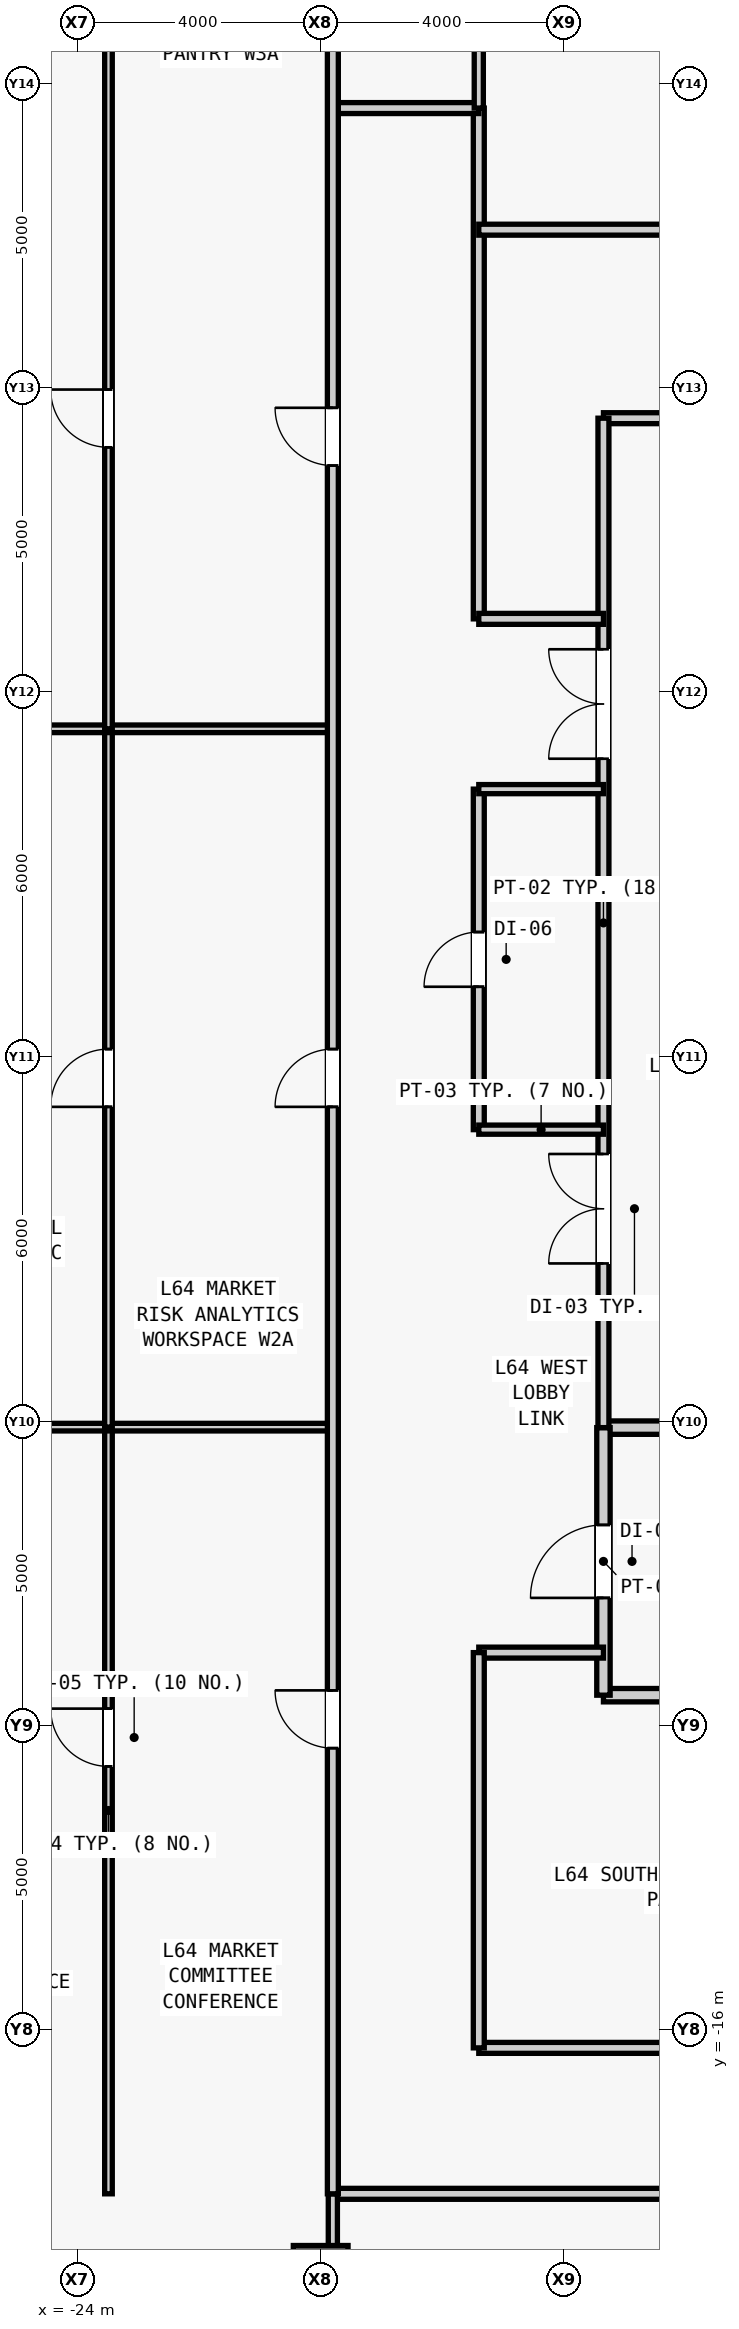
"""IFC4 building model, lengths in metres.
Left out: names, types, materials, properties, quantities, classifications, styles, units other than length and angle.
Written with IfcOpenShell. Run it as: python <this file> out.ifc"""

import sys

from ifc_helpers import new_model, si_unit, direction, frame, frame_2d, origin, origin_2d, place, context, subcontext, project, spatial, rectangle, hollow_rectangle, extrude, source, transform, mapped, element, fill, save


model = new_model("IFC4")
c1 = context("Model", 3, precision=1e-05, world=origin(), true_north=direction((0.0, 1.0)))
c2 = subcontext(c1, "Body", "Model", "MODEL_VIEW")
j1 = project(units=[si_unit("LENGTHUNIT", "METRE"), si_unit("PLANEANGLEUNIT", "RADIAN")], contexts=[c1])
p1 = place(None, origin())
s1 = spatial("IfcSite", under=j1, at=p1, CompositionType="ELEMENT")
p2 = place(p1, origin())
s2 = spatial("IfcBuilding", under=s1, at=p2, CompositionType="ELEMENT")
p3 = place(p2, frame((0.0, 0.0, 273.5)))
s3 = spatial("IfcBuildingStorey", under=s2, at=p3, CompositionType="ELEMENT", Elevation=273.5)
m1 = source(origin(), c2, "Body", "SweptSolid", [
    extrude(hollow_rectangle(XDim=0.9, YDim=0.9, WallThickness=0.05, at=origin_2d()), origin(), (0.0, 0.0, 1.0), 4.0),
])
p4 = place(p3, frame((-20.0, -20.0, 0.0), z_axis=(0.0, 0.0, 1.0), x_axis=(1.0, 0.0, 0.0)))
e1 = element("IfcColumn", 1, at=p4, inside=s3, PredefinedType="COLUMN", context=c2, shape_type="MappedRepresentation", body=[
    mapped(m1, transform((0.0, 0.0, 0.0), scale=1.0)),
])
m2 = source(origin(), c2, "Body", "SweptSolid", [
    extrude(rectangle(XDim=4.05, YDim=0.22, at=frame_2d((2.025, 0.0))), origin(), (0.0, 0.0, 1.0), 3.78),
])
p5 = place(p3, frame((-15.35, -10.5, 0.0), z_axis=(0.0, 0.0, 1.0), x_axis=(1.0, 0.0, 0.0)))
e2 = element("IfcWall", 2, at=p5, inside=s3, PredefinedType="PARTITIONING", context=c2, shape_type="MappedRepresentation", body=[
    mapped(m2, transform((0.0, 0.0, 0.0), scale=1.0)),
])
m3 = source(origin(), c2, "Body", "SweptSolid", [
    extrude(rectangle(XDim=4.05, YDim=0.22, at=frame_2d((2.025, 0.0))), origin(), (0.0, 0.0, 1.0), 3.085),
])
p6 = place(p3, frame((-15.35, -6.1, 0.0), z_axis=(0.0, 0.0, 1.0), x_axis=(1.0, 0.0, 0.0)))
e3 = element("IfcWall", 3, at=p6, inside=s3, PredefinedType="PARTITIONING", context=c2, shape_type="MappedRepresentation", body=[
    mapped(m3, transform((0.0, 0.0, 0.0), scale=1.0)),
])
m4 = source(origin(), c2, "Body", "SweptSolid", [
    extrude(rectangle(XDim=4.4, YDim=0.22, at=frame_2d((2.2, 0.0))), origin(), (0.0, 0.0, 1.0), 3.78),
])
p7 = place(p3, frame((-15.35, -10.5, 0.0), z_axis=(0.0, 0.0, 1.0), x_axis=(0.0, 1.0, 0.0)))
e4 = element("IfcWall", 4, at=p7, inside=s3, PredefinedType="PARTITIONING", context=c2, shape_type="MappedRepresentation", body=[
    mapped(m4, transform((0.0, 0.0, 0.0), scale=1.0)),
])
m5 = source(origin(), c2, "Body", "SweptSolid", [
    extrude(rectangle(XDim=1.2, YDim=2.2, at=frame_2d((0.6, 1.1))), frame((0.0, 0.12, 0.0), z_axis=(0.0, -1.0, 0.0), x_axis=(1.0, 0.0, 0.0)), (0.0, 0.0, 1.0), 0.24),
])
p8 = place(p7, frame((1.6, 0.0, 0.0)))
e5 = element("IfcOpeningElement", 5, at=p8, cuts=e4, PredefinedType="OPENING", context=c2, shape_type="MappedRepresentation", body=[
    mapped(m5, transform((0.0, 0.0, 0.0), scale=1.0)),
])
m6 = source(origin(), c2, "Body", "SweptSolid", [
    extrude(rectangle(XDim=4.05, YDim=0.18, at=frame_2d((2.025, 0.0))), origin(), (0.0, 0.0, 1.0), 3.78),
])
p9 = place(p3, frame((-15.35, 10.5, 0.0), z_axis=(0.0, 0.0, 1.0), x_axis=(1.0, 0.0, 0.0)))
e6 = element("IfcWall", 6, at=p9, inside=s3, PredefinedType="PARTITIONING", context=c2, shape_type="MappedRepresentation", body=[
    mapped(m6, transform((0.0, 0.0, 0.0), scale=1.0)),
])
m7 = source(origin(), c2, "Body", "SweptSolid", [
    extrude(rectangle(XDim=16.6, YDim=0.18, at=frame_2d((8.3, 0.0))), origin(), (0.0, 0.0, 1.0), 3.78),
])
p10 = place(p3, frame((-15.35, -6.1, 0.0), z_axis=(0.0, 0.0, 1.0), x_axis=(0.0, 1.0, 0.0)))
e7 = element("IfcWall", 7, at=p10, inside=s3, PredefinedType="PARTITIONING", context=c2, shape_type="MappedRepresentation", body=[
    mapped(m7, transform((0.0, 0.0, 0.0), scale=1.0)),
])
m8 = source(origin(), c2, "Body", "SweptSolid", [
    extrude(rectangle(XDim=1.8, YDim=2.25, at=frame_2d((0.9, 1.125))), frame((0.0, 0.1, 0.0), z_axis=(0.0, -1.0, 0.0), x_axis=(1.0, 0.0, 0.0)), (0.0, 0.0, 1.0), 0.2),
])
p11 = place(p10, frame((2.7, 0.0, 0.0)))
e8 = element("IfcOpeningElement", 8, at=p11, cuts=e7, PredefinedType="OPENING", context=c2, shape_type="MappedRepresentation", body=[
    mapped(m8, transform((0.0, 0.0, 0.0), scale=1.0)),
])
p12 = place(p10, frame((11.0, 0.0, 0.0)))
e9 = element("IfcOpeningElement", 9, at=p12, cuts=e7, PredefinedType="OPENING", context=c2, shape_type="MappedRepresentation", body=[
    mapped(m8, transform((0.0, 0.0, 0.0), scale=1.0)),
])
m9 = source(origin(), c2, "Body", "SweptSolid", [
    extrude(rectangle(XDim=5.6, YDim=0.18, at=frame_2d((2.8, 0.0))), origin(), (0.0, 0.0, 1.0), 3.78),
])
p13 = place(p3, frame((-17.4, -1.2, 0.0), z_axis=(0.0, 0.0, 1.0), x_axis=(0.0, 1.0, 0.0)))
e10 = element("IfcWall", 10, at=p13, inside=s3, PredefinedType="PARTITIONING", context=c2, shape_type="MappedRepresentation", body=[
    mapped(m9, transform((0.0, 0.0, 0.0), scale=1.0)),
])
m10 = source(origin(), c2, "Body", "SweptSolid", [
    extrude(rectangle(XDim=0.9, YDim=2.15, at=frame_2d((0.45, 1.075))), frame((0.0, 0.1, 0.0), z_axis=(0.0, -1.0, 0.0), x_axis=(1.0, 0.0, 0.0)), (0.0, 0.0, 1.0), 0.2),
])
p14 = place(p13, frame((2.35, 0.0, 0.0)))
e11 = element("IfcOpeningElement", 11, at=p14, cuts=e10, PredefinedType="OPENING", context=c2, shape_type="MappedRepresentation", body=[
    mapped(m10, transform((0.0, 0.0, 0.0), scale=1.0)),
])
m11 = source(origin(), c2, "Body", "SweptSolid", [
    extrude(rectangle(XDim=2.05, YDim=0.15, at=frame_2d((1.025, 0.0))), origin(), (0.0, 0.0, 1.0), 3.78),
])
for number, where, z_axis, x_axis in (
    (12, (-17.4, -1.2, 0.0), (0.0, 0.0, 1.0), (1.0, 0.0, 0.0)),
    (13, (-17.4, 4.4, 0.0), (0.0, 0.0, 1.0), (1.0, 0.0, 0.0)),
):
    element("IfcWall", number, at=place(p3, frame(where, z_axis=z_axis, x_axis=x_axis)), inside=s3, PredefinedType="PARTITIONING", context=c2, shape_type="MappedRepresentation", body=[
        mapped(m11, transform((0.0, 0.0, 0.0), scale=1.0)),
    ])
m12 = source(origin(), c2, "Body", "SweptSolid", [
    extrude(rectangle(XDim=2.05, YDim=0.18, at=frame_2d((1.025, 0.0))), origin(), (0.0, 0.0, 1.0), 3.78),
])
p15 = place(p3, frame((-17.4, -9.8, 0.0), z_axis=(0.0, 0.0, 1.0), x_axis=(1.0, 0.0, 0.0)))
e14 = element("IfcWall", 14, at=p15, inside=s3, PredefinedType="PARTITIONING", context=c2, shape_type="MappedRepresentation", body=[
    mapped(m12, transform((0.0, 0.0, 0.0), scale=1.0)),
])
m13 = source(origin(), c2, "Body", "SweptSolid", [
    extrude(rectangle(XDim=8.4, YDim=0.18, at=frame_2d((4.2, 0.0))), origin(), (0.0, 0.0, 1.0), 3.78),
])
p16 = place(p3, frame((-17.4, 7.2, 0.0), z_axis=(0.0, 0.0, 1.0), x_axis=(0.0, 1.0, 0.0)))
e15 = element("IfcWall", 15, at=p16, inside=s3, PredefinedType="PARTITIONING", context=c2, shape_type="MappedRepresentation", body=[
    mapped(m13, transform((0.0, 0.0, 0.0), scale=1.0)),
])
p17 = place(p3, frame((-17.4, 7.2, 0.0), z_axis=(0.0, 0.0, 1.0), x_axis=(1.0, 0.0, 0.0)))
e16 = element("IfcWall", 16, at=p17, inside=s3, PredefinedType="PARTITIONING", context=c2, shape_type="MappedRepresentation", body=[
    mapped(m12, transform((0.0, 0.0, 0.0), scale=1.0)),
])
m14 = source(origin(), c2, "Body", "SweptSolid", [
    extrude(rectangle(XDim=16.1, YDim=0.18, at=frame_2d((8.05, 0.0))), origin(), (0.0, 0.0, 1.0), 3.78),
])
p18 = place(p3, frame((-17.4, -16.3, 0.0), z_axis=(0.0, 0.0, 1.0), x_axis=(1.0, 0.0, 0.0)))
e17 = element("IfcWall", 17, at=p18, inside=s3, PredefinedType="PARTITIONING", context=c2, shape_type="MappedRepresentation", body=[
    mapped(m14, transform((0.0, 0.0, 0.0), scale=1.0)),
])
p19 = place(p18, frame((8.95, 0.0, 0.0)))
e18 = element("IfcOpeningElement", 18, at=p19, cuts=e17, PredefinedType="OPENING", context=c2, shape_type="MappedRepresentation", body=[
    mapped(m10, transform((0.0, 0.0, 0.0), scale=1.0)),
])
m15 = source(origin(), c2, "Body", "SweptSolid", [
    extrude(rectangle(XDim=6.5, YDim=0.18, at=frame_2d((3.25, 0.0))), origin(), (0.0, 0.0, 1.0), 3.78),
])
p20 = place(p3, frame((-17.4, -16.3, 0.0), z_axis=(0.0, 0.0, 1.0), x_axis=(0.0, 1.0, 0.0)))
e19 = element("IfcWall", 19, at=p20, inside=s3, PredefinedType="PARTITIONING", context=c2, shape_type="MappedRepresentation", body=[
    mapped(m15, transform((0.0, 0.0, 0.0), scale=1.0)),
])
m16 = source(origin(), c2, "Body", "SweptSolid", [
    extrude(rectangle(XDim=2.4, YDim=0.18, at=frame_2d((1.2, 0.0))), origin(), (0.0, 0.0, 1.0), 3.78),
])
p21 = place(p3, frame((-19.8, 15.6, 0.0), z_axis=(0.0, 0.0, 1.0), x_axis=(1.0, 0.0, 0.0)))
e20 = element("IfcWall", 20, at=p21, inside=s3, PredefinedType="PARTITIONING", context=c2, shape_type="MappedRepresentation", body=[
    mapped(m16, transform((0.0, 0.0, 0.0), scale=1.0)),
])
m17 = source(origin(), c2, "Body", "SweptSolid", [
    extrude(rectangle(XDim=37.55, YDim=0.18, at=frame_2d((18.775, 0.0))), origin(), (0.0, 0.0, 1.0), 3.78),
])
p22 = place(p3, frame((-19.8, -18.7, 0.0), z_axis=(0.0, 0.0, 1.0), x_axis=(1.0, 0.0, 0.0)))
e21 = element("IfcWall", 21, at=p22, inside=s3, PredefinedType="PARTITIONING", context=c2, shape_type="MappedRepresentation", body=[
    mapped(m17, transform((0.0, 0.0, 0.0), scale=1.0)),
])
m18 = source(origin(), c2, "Body", "SweptSolid", [
    extrude(rectangle(XDim=1.05, YDim=2.2, at=frame_2d((0.525, 1.1))), frame((0.0, 0.1, 0.0), z_axis=(0.0, -1.0, 0.0), x_axis=(1.0, 0.0, 0.0)), (0.0, 0.0, 1.0), 0.2),
])
p23 = place(p22, frame((7.11, 0.0, 0.0)))
e22 = element("IfcOpeningElement", 22, at=p23, cuts=e21, PredefinedType="OPENING", context=c2, shape_type="MappedRepresentation", body=[
    mapped(m18, transform((0.0, 0.0, 0.0), scale=1.0)),
])
p24 = place(p22, frame((24.86, 0.0, 0.0)))
e23 = element("IfcOpeningElement", 23, at=p24, cuts=e21, PredefinedType="OPENING", context=c2, shape_type="MappedRepresentation", body=[
    mapped(m18, transform((0.0, 0.0, 0.0), scale=1.0)),
])
m19 = source(origin(), c2, "Body", "SweptSolid", [
    extrude(rectangle(XDim=9.3, YDim=0.15, at=frame_2d((4.65, 0.0))), origin(), (0.0, 0.0, 1.0), 3.164),
])
p25 = place(p3, frame((-19.8, -28.0, 0.0), z_axis=(0.0, 0.0, 1.0), x_axis=(0.0, 1.0, 0.0)))
e24 = element("IfcWall", 24, at=p25, inside=s3, PredefinedType="PARTITIONING", context=c2, shape_type="MappedRepresentation", body=[
    mapped(m19, transform((0.0, 0.0, 0.0), scale=1.0)),
])
m20 = source(origin(), c2, "Body", "SweptSolid", [
    extrude(rectangle(XDim=32.75, YDim=0.18, at=frame_2d((16.375, 0.0))), origin(), (0.0, 0.0, 1.0), 3.78),
])
p26 = place(p3, frame((-17.4, 13.6, 0.0), z_axis=(0.0, 0.0, 1.0), x_axis=(1.0, 0.0, 0.0)))
e25 = element("IfcWall", 25, at=p26, inside=s3, PredefinedType="PARTITIONING", context=c2, shape_type="MappedRepresentation", body=[
    mapped(m20, transform((0.0, 0.0, 0.0), scale=1.0)),
])
p27 = place(p26, frame((27.075, 0.0, 0.0)))
e26 = element("IfcOpeningElement", 26, at=p27, cuts=e25, PredefinedType="OPENING", context=c2, shape_type="MappedRepresentation", body=[
    mapped(m18, transform((0.0, 0.0, 0.0), scale=1.0)),
])
m21 = source(origin(), c2, "Body", "SweptSolid", [
    extrude(rectangle(XDim=12.4, YDim=0.15, at=frame_2d((6.2, 0.0))), origin(), (0.0, 0.0, 1.0), 3.78),
])
p28 = place(p3, frame((-17.4, 15.6, 0.0), z_axis=(0.0, 0.0, 1.0), x_axis=(0.0, 1.0, 0.0)))
e27 = element("IfcWall", 27, at=p28, inside=s3, PredefinedType="PARTITIONING", context=c2, shape_type="MappedRepresentation", body=[
    mapped(m21, transform((0.0, 0.0, 0.0), scale=1.0)),
])
m22 = source(origin(), c2, "Body", "SweptSolid", [
    extrude(rectangle(XDim=12.608, YDim=0.125, at=frame_2d((6.304, 0.0))), origin(), (0.0, 0.0, 1.0), 3.78),
])
p29 = place(p3, frame((-23.49, -18.7, 0.0), z_axis=(0.0, 0.0, 1.0), x_axis=(0.0, 1.0, 0.0)))
e28 = element("IfcWall", 28, at=p29, inside=s3, PredefinedType="PARTITIONING", context=c2, shape_type="MappedRepresentation", body=[
    mapped(m22, transform((0.0, 0.0, 0.0), scale=1.0)),
])
m23 = source(origin(), c2, "Body", "SweptSolid", [
    extrude(rectangle(XDim=0.95, YDim=2.15, at=frame_2d((0.475, 1.075))), frame((0.0, 0.073, 0.0), z_axis=(0.0, -1.0, 0.0), x_axis=(1.0, 0.0, 0.0)), (0.0, 0.0, 1.0), 0.145),
])
p30 = place(p29, frame((7.029, 0.0, 0.0)))
e29 = element("IfcOpeningElement", 29, at=p30, cuts=e28, PredefinedType="OPENING", context=c2, shape_type="MappedRepresentation", body=[
    mapped(m23, transform((0.0, 0.0, 0.0), scale=1.0)),
])
m24 = source(origin(), c2, "Body", "SweptSolid", [
    extrude(rectangle(XDim=8.2, YDim=0.125, at=frame_2d((4.1, 0.0))), origin(), (0.0, 0.0, 1.0), 3.085),
])
p31 = place(p3, frame((-28.0, -6.092, 0.0), z_axis=(0.0, 0.0, 1.0), x_axis=(1.0, 0.0, 0.0)))
e30 = element("IfcWall", 30, at=p31, inside=s3, PredefinedType="PARTITIONING", context=c2, shape_type="MappedRepresentation", body=[
    mapped(m24, transform((0.0, 0.0, 0.0), scale=1.0)),
])
m25 = source(origin(), c2, "Body", "SweptSolid", [
    extrude(rectangle(XDim=11.484, YDim=0.125, at=frame_2d((5.742, 0.0))), origin(), (0.0, 0.0, 1.0), 3.78),
])
p32 = place(p3, frame((-23.49, -6.092, 0.0), z_axis=(0.0, 0.0, 1.0), x_axis=(0.0, 1.0, 0.0)))
e31 = element("IfcWall", 31, at=p32, inside=s3, PredefinedType="PARTITIONING", context=c2, shape_type="MappedRepresentation", body=[
    mapped(m25, transform((0.0, 0.0, 0.0), scale=1.0)),
])
p33 = place(p32, frame((5.267, 0.0, 0.0)))
e32 = element("IfcOpeningElement", 32, at=p33, cuts=e31, PredefinedType="OPENING", context=c2, shape_type="MappedRepresentation", body=[
    mapped(m23, transform((0.0, 0.0, 0.0), scale=1.0)),
])
m26 = source(origin(), c2, "Body", "SweptSolid", [
    extrude(rectangle(XDim=8.2, YDim=0.125, at=frame_2d((4.1, 0.0))), origin(), (0.0, 0.0, 1.0), 3.78),
])
p34 = place(p3, frame((-28.0, 5.392, 0.0), z_axis=(0.0, 0.0, 1.0), x_axis=(1.0, 0.0, 0.0)))
e33 = element("IfcWall", 33, at=p34, inside=s3, PredefinedType="PARTITIONING", context=c2, shape_type="MappedRepresentation", body=[
    mapped(m26, transform((0.0, 0.0, 0.0), scale=1.0)),
])
m27 = source(origin(), c2, "Body", "SweptSolid", [
    extrude(rectangle(XDim=16.808, YDim=0.125, at=frame_2d((8.404, 0.0))), origin(), (0.0, 0.0, 1.0), 3.78),
])
p35 = place(p3, frame((-23.49, 5.392, 0.0), z_axis=(0.0, 0.0, 1.0), x_axis=(0.0, 1.0, 0.0)))
e34 = element("IfcWall", 34, at=p35, inside=s3, PredefinedType="PARTITIONING", context=c2, shape_type="MappedRepresentation", body=[
    mapped(m27, transform((0.0, 0.0, 0.0), scale=1.0)),
])
p36 = place(p35, frame((4.629, 0.0, 0.0)))
e35 = element("IfcOpeningElement", 35, at=p36, cuts=e34, PredefinedType="OPENING", context=c2, shape_type="MappedRepresentation", body=[
    mapped(m23, transform((0.0, 0.0, 0.0), scale=1.0)),
])
m28 = source(origin(), c2, "Body", "SweptSolid", [
    extrude(rectangle(XDim=41.2, YDim=0.18, at=frame_2d((20.6, 0.0))), origin(), (0.0, 0.0, 1.0), 3.164),
])
p37 = place(p3, frame((-19.8, -18.7, 0.0), z_axis=(0.0, 0.0, 1.0), x_axis=(0.0, 1.0, 0.0)))
e36 = element("IfcWall", 36, at=p37, inside=s3, PredefinedType="PARTITIONING", context=c2, shape_type="MappedRepresentation", body=[
    mapped(m28, transform((0.0, 0.0, 0.0), scale=1.0)),
])
m29 = source(origin(), c2, "Body", "SweptSolid", [
    extrude(rectangle(XDim=0.95, YDim=2.15, at=frame_2d((0.475, 1.075))), frame((0.0, 0.1, 0.0), z_axis=(0.0, -1.0, 0.0), x_axis=(1.0, 0.0, 0.0)), (0.0, 0.0, 1.0), 0.2),
])
p38 = place(p37, frame((7.329, 0.0, 0.0)))
e37 = element("IfcOpeningElement", 37, at=p38, cuts=e36, PredefinedType="OPENING", context=c2, shape_type="MappedRepresentation", body=[
    mapped(m29, transform((0.0, 0.0, 0.0), scale=1.0)),
])
p39 = place(p37, frame((17.875, 0.0, 0.0)))
e38 = element("IfcOpeningElement", 38, at=p39, cuts=e36, PredefinedType="OPENING", context=c2, shape_type="MappedRepresentation", body=[
    mapped(m29, transform((0.0, 0.0, 0.0), scale=1.0)),
])
p40 = place(p37, frame((28.421, 0.0, 0.0)))
e39 = element("IfcOpeningElement", 39, at=p40, cuts=e36, PredefinedType="OPENING", context=c2, shape_type="MappedRepresentation", body=[
    mapped(m29, transform((0.0, 0.0, 0.0), scale=1.0)),
])
m30 = source(origin(), c2, "Body", "SweptSolid", [
    extrude(rectangle(XDim=1.2, YDim=2.2, at=frame_2d((0.6, 1.1))), frame((0.0, 0.025, 0.0), z_axis=(0.0, -1.0, 0.0), x_axis=(1.0, 0.0, 0.0)), (0.0, 0.0, 1.0), 0.05),
])
p41 = place(p8, origin())
e40 = element("IfcDoor", 40, at=p41, inside=s3, OperationType="SINGLE_SWING_LEFT", PredefinedType="DOOR", context=c2, shape_type="MappedRepresentation", body=[
    mapped(m30, transform((0.0, 0.0, 0.0), scale=1.0)),
])
fill(e5, e40)
m31 = source(origin(), c2, "Body", "SweptSolid", [
    extrude(rectangle(XDim=1.8, YDim=2.25, at=frame_2d((0.9, 1.125))), frame((0.0, 0.025, 0.0), z_axis=(0.0, -1.0, 0.0), x_axis=(1.0, 0.0, 0.0)), (0.0, 0.0, 1.0), 0.05),
])
p42 = place(p11, origin())
e41 = element("IfcDoor", 41, at=p42, inside=s3, OperationType="SINGLE_SWING_LEFT", PredefinedType="DOOR", context=c2, shape_type="MappedRepresentation", body=[
    mapped(m31, transform((0.0, 0.0, 0.0), scale=1.0)),
])
fill(e8, e41)
p43 = place(p12, origin())
e42 = element("IfcDoor", 42, at=p43, inside=s3, OperationType="SINGLE_SWING_RIGHT", PredefinedType="DOOR", context=c2, shape_type="MappedRepresentation", body=[
    mapped(m31, transform((0.0, 0.0, 0.0), scale=1.0)),
])
fill(e9, e42)
m32 = source(origin(), c2, "Body", "SweptSolid", [
    extrude(rectangle(XDim=0.9, YDim=2.15, at=frame_2d((0.45, 1.075))), frame((0.0, 0.025, 0.0), z_axis=(0.0, -1.0, 0.0), x_axis=(1.0, 0.0, 0.0)), (0.0, 0.0, 1.0), 0.05),
])
p44 = place(p14, origin())
e43 = element("IfcDoor", 43, at=p44, inside=s3, OperationType="SINGLE_SWING_LEFT", PredefinedType="DOOR", context=c2, shape_type="MappedRepresentation", body=[
    mapped(m32, transform((0.0, 0.0, 0.0), scale=1.0)),
])
fill(e11, e43)
m33 = source(origin(), c2, "Body", "SweptSolid", [
    extrude(rectangle(XDim=0.95, YDim=2.15, at=frame_2d((0.475, 1.075))), frame((0.0, 0.025, 0.0), z_axis=(0.0, -1.0, 0.0), x_axis=(1.0, 0.0, 0.0)), (0.0, 0.0, 1.0), 0.05),
])
p45 = place(p30, origin())
e44 = element("IfcDoor", 44, at=p45, inside=s3, OperationType="SINGLE_SWING_RIGHT", PredefinedType="DOOR", context=c2, shape_type="MappedRepresentation", body=[
    mapped(m33, transform((0.0, 0.0, 0.0), scale=1.0)),
])
fill(e29, e44)
p46 = place(p33, origin())
e45 = element("IfcDoor", 45, at=p46, inside=s3, OperationType="SINGLE_SWING_LEFT", PredefinedType="DOOR", context=c2, shape_type="MappedRepresentation", body=[
    mapped(m33, transform((0.0, 0.0, 0.0), scale=1.0)),
])
fill(e32, e45)
p47 = place(p36, origin())
e46 = element("IfcDoor", 46, at=p47, inside=s3, OperationType="SINGLE_SWING_RIGHT", PredefinedType="DOOR", context=c2, shape_type="MappedRepresentation", body=[
    mapped(m33, transform((0.0, 0.0, 0.0), scale=1.0)),
])
fill(e35, e46)
p48 = place(p38, origin())
e47 = element("IfcDoor", 47, at=p48, inside=s3, OperationType="SINGLE_SWING_RIGHT", PredefinedType="DOOR", context=c2, shape_type="MappedRepresentation", body=[
    mapped(m33, transform((0.0, 0.0, 0.0), scale=1.0)),
])
fill(e37, e47)
p49 = place(p39, origin())
e48 = element("IfcDoor", 48, at=p49, inside=s3, OperationType="SINGLE_SWING_LEFT", PredefinedType="DOOR", context=c2, shape_type="MappedRepresentation", body=[
    mapped(m33, transform((0.0, 0.0, 0.0), scale=1.0)),
])
fill(e38, e48)
p50 = place(p40, origin())
e49 = element("IfcDoor", 49, at=p50, inside=s3, OperationType="SINGLE_SWING_RIGHT", PredefinedType="DOOR", context=c2, shape_type="MappedRepresentation", body=[
    mapped(m33, transform((0.0, 0.0, 0.0), scale=1.0)),
])
fill(e39, e49)
save(model, sys.argv[1])
